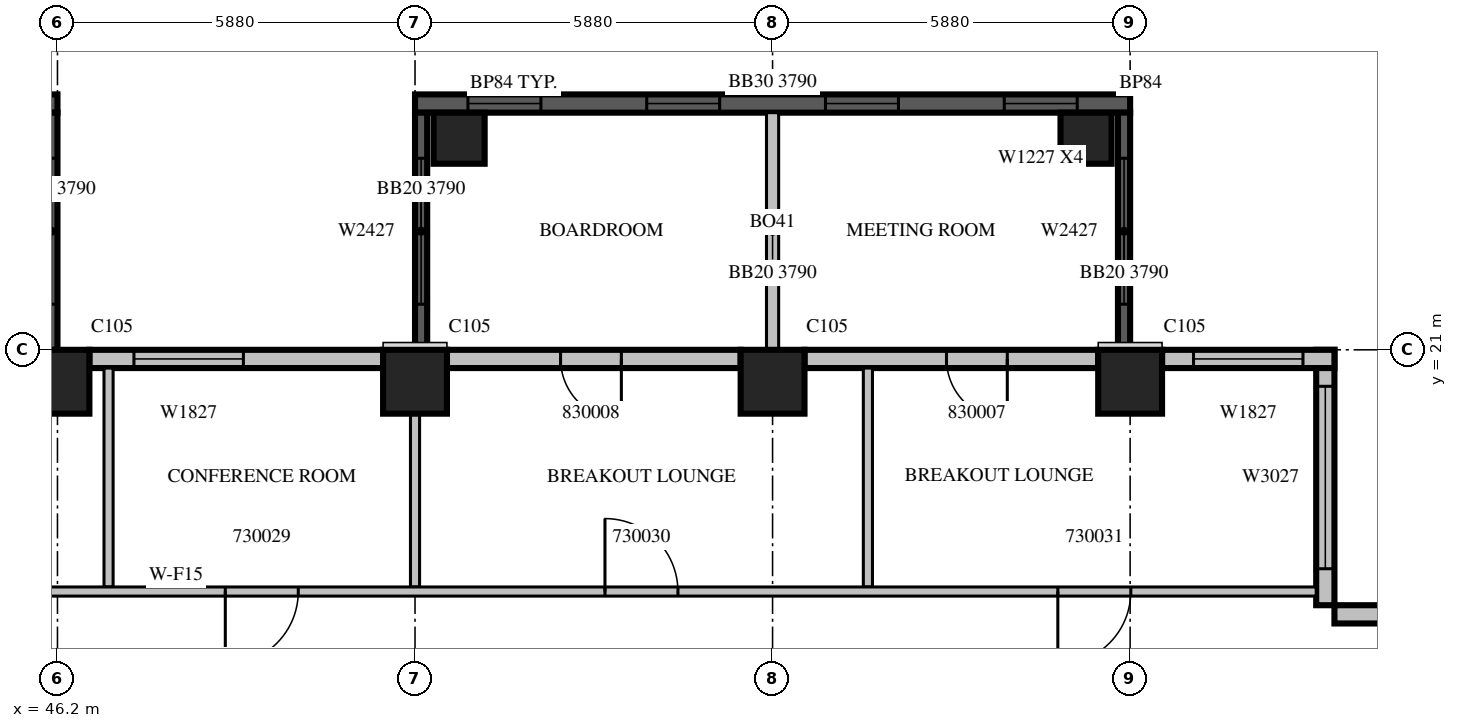
"""IFC4 building model, lengths in metres.
Left out: names, types, materials, properties, quantities, classifications, styles, units other than length and angle.
Written with IfcOpenShell. Run it as: python <this file> out.ifc"""

import sys

from ifc_helpers import new_model, si_unit, direction, frame, frame_2d, origin, origin_2d, place, context, subcontext, project, spatial, rectangle, extrude, source, transform, mapped, element, fill, save


model = new_model("IFC4")
c1 = context("Model", 3, precision=1e-05, world=origin(), true_north=direction((0.0, 1.0)))
c2 = subcontext(c1, "Body", "Model", "MODEL_VIEW")
j1 = project(units=[si_unit("LENGTHUNIT", "METRE"), si_unit("PLANEANGLEUNIT", "RADIAN")], contexts=[c1])
p1 = place(None, origin())
s1 = spatial("IfcSite", under=j1, at=p1, CompositionType="ELEMENT")
p2 = place(p1, origin())
s2 = spatial("IfcBuilding", under=s1, at=p2, CompositionType="ELEMENT")
p3 = place(p2, frame((0.0, 0.0, 137.1)))
s3 = spatial("IfcBuildingStorey", under=s2, at=p3, CompositionType="ELEMENT", Elevation=137.1)
m1 = source(origin(), c2, "Body", "SweptSolid", [
    extrude(rectangle(XDim=1.05, YDim=1.05, at=origin_2d()), origin(), (0.0, 0.0, 1.0), 4.2),
])
for number, where, z_axis, x_axis in (
    (1, (46.2, 20.475, 0.0), (0.0, 0.0, 1.0), (1.0, 0.0, 0.0)),
    (2, (52.08, 20.475, 0.0), (0.0, 0.0, 1.0), (1.0, 0.0, 0.0)),
    (3, (57.96, 20.475, 0.0), (0.0, 0.0, 1.0), (1.0, 0.0, 0.0)),
    (4, (63.84, 20.475, 0.0), (0.0, 0.0, 1.0), (1.0, 0.0, 0.0)),
):
    element("IfcColumn", number, at=place(p3, frame(where, z_axis=z_axis, x_axis=x_axis)), inside=s3, PredefinedType="COLUMN", context=c2, shape_type="MappedRepresentation", body=[
        mapped(m1, transform((0.0, 0.0, 0.0), scale=1.0)),
    ])
m2 = source(origin(), c2, "Body", "SweptSolid", [
    extrude(rectangle(XDim=0.84, YDim=0.84, at=origin_2d()), origin(), (0.0, 0.0, 1.0), 4.2),
])
for number, where, z_axis, x_axis in (
    (5, (52.805, 24.48, 0.0), (0.0, 0.0, 1.0), (1.0, 0.0, 0.0)),
    (6, (63.115, 24.48, 0.0), (0.0, 0.0, 1.0), (1.0, 0.0, 0.0)),
):
    element("IfcColumn", number, at=place(p3, frame(where, z_axis=z_axis, x_axis=x_axis)), inside=s3, PredefinedType="COLUMN", context=c2, shape_type="MappedRepresentation", body=[
        mapped(m2, transform((0.0, 0.0, 0.0), scale=1.0)),
    ])
m3 = source(origin(), c2, "Body", "SweptSolid", [
    extrude(rectangle(XDim=11.76, YDim=0.3, at=frame_2d((5.88, 0.0))), origin(), (0.0, 0.0, 1.0), 3.79),
])
p4 = place(p3, frame((63.84, 25.05, 0.0), z_axis=(0.0, 0.0, 1.0), x_axis=(-1.0, 0.0, 0.0)))
e7 = element("IfcWall", 7, at=p4, inside=s3, PredefinedType="SOLIDWALL", context=c2, shape_type="MappedRepresentation", body=[
    mapped(m3, transform((0.0, 0.0, 0.0), scale=1.0)),
])
m4 = source(origin(), c2, "Body", "SweptSolid", [
    extrude(rectangle(XDim=1.2, YDim=2.7, at=frame_2d((0.6, 1.35))), frame((0.0, 0.16, 0.0), z_axis=(0.0, -1.0, 0.0), x_axis=(1.0, 0.0, 0.0)), (0.0, 0.0, 1.0), 0.32),
])
p5 = place(p4, frame((0.87, 0.0, 0.6)))
e8 = element("IfcOpeningElement", 8, at=p5, cuts=e7, PredefinedType="OPENING", context=c2, shape_type="MappedRepresentation", body=[
    mapped(m4, transform((0.0, 0.0, 0.0), scale=1.0)),
])
p6 = place(p4, frame((3.81, 0.0, 0.6)))
e9 = element("IfcOpeningElement", 9, at=p6, cuts=e7, PredefinedType="OPENING", context=c2, shape_type="MappedRepresentation", body=[
    mapped(m4, transform((0.0, 0.0, 0.0), scale=1.0)),
])
p7 = place(p4, frame((6.75, 0.0, 0.6)))
e10 = element("IfcOpeningElement", 10, at=p7, cuts=e7, PredefinedType="OPENING", context=c2, shape_type="MappedRepresentation", body=[
    mapped(m4, transform((0.0, 0.0, 0.0), scale=1.0)),
])
p8 = place(p4, frame((9.69, 0.0, 0.6)))
e11 = element("IfcOpeningElement", 11, at=p8, cuts=e7, PredefinedType="OPENING", context=c2, shape_type="MappedRepresentation", body=[
    mapped(m4, transform((0.0, 0.0, 0.0), scale=1.0)),
])
m5 = source(origin(), c2, "Body", "SweptSolid", [
    extrude(rectangle(XDim=3.9, YDim=0.2, at=frame_2d((1.95, 0.0))), origin(), (0.0, 0.0, 1.0), 3.79),
])
p9 = place(p3, frame((57.96, 21.0, 0.0), z_axis=(0.0, 0.0, 1.0), x_axis=(0.0, 1.0, 0.0)))
e12 = element("IfcWall", 12, at=p9, inside=s3, PredefinedType="SOLIDWALL", context=c2, shape_type="MappedRepresentation", body=[
    mapped(m5, transform((0.0, 0.0, 0.0), scale=1.0)),
])
m6 = source(origin(), c2, "Body", "SweptSolid", [
    extrude(rectangle(XDim=3.9, YDim=0.2, at=frame_2d((1.95, 0.0))), origin(), (0.0, 0.0, 1.0), 3.79),
])
p10 = place(p3, frame((63.74, 21.0, 0.0), z_axis=(0.0, 0.0, 1.0), x_axis=(0.0, 1.0, 0.0)))
e13 = element("IfcWall", 13, at=p10, inside=s3, PredefinedType="SOLIDWALL", context=c2, shape_type="MappedRepresentation", body=[
    mapped(m6, transform((0.0, 0.0, 0.0), scale=1.0)),
])
m7 = source(origin(), c2, "Body", "SweptSolid", [
    extrude(rectangle(XDim=2.4, YDim=2.7, at=frame_2d((1.2, 1.35))), frame((0.0, 0.11, 0.0), z_axis=(0.0, -1.0, 0.0), x_axis=(1.0, 0.0, 0.0)), (0.0, 0.0, 1.0), 0.22),
])
p11 = place(p10, frame((0.75, 0.0, 0.6)))
e14 = element("IfcOpeningElement", 14, at=p11, cuts=e13, PredefinedType="OPENING", context=c2, shape_type="MappedRepresentation", body=[
    mapped(m7, transform((0.0, 0.0, 0.0), scale=1.0)),
])
p12 = place(p3, frame((52.18, 21.0, 0.0), z_axis=(0.0, 0.0, 1.0), x_axis=(0.0, 1.0, 0.0)))
e15 = element("IfcWall", 15, at=p12, inside=s3, PredefinedType="SOLIDWALL", context=c2, shape_type="MappedRepresentation", body=[
    mapped(m6, transform((0.0, 0.0, 0.0), scale=1.0)),
])
p13 = place(p12, frame((0.75, 0.0, 0.6)))
e16 = element("IfcOpeningElement", 16, at=p13, cuts=e15, PredefinedType="OPENING", context=c2, shape_type="MappedRepresentation", body=[
    mapped(m7, transform((0.0, 0.0, 0.0), scale=1.0)),
])
m8 = source(origin(), c2, "Body", "SweptSolid", [
    extrude(rectangle(XDim=4.2, YDim=0.3, at=frame_2d((2.1, 0.0))), origin(), (0.0, 0.0, 1.0), 3.8),
])
p14 = place(p3, frame((71.4, 16.65, 0.0), z_axis=(0.0, 0.0, 1.0), x_axis=(-1.0, 0.0, 0.0)))
e17 = element("IfcWall", 17, at=p14, inside=s3, PredefinedType="STANDARD", context=c2, shape_type="MappedRepresentation", body=[
    mapped(m8, transform((0.0, 0.0, 0.0), scale=1.0)),
])
p15 = place(p14, frame((0.66, 0.0, 0.6)))
e18 = element("IfcOpeningElement", 18, at=p15, cuts=e17, PredefinedType="OPENING", context=c2, shape_type="MappedRepresentation", body=[
    mapped(m4, transform((0.0, 0.0, 0.0), scale=1.0)),
])
p16 = place(p3, frame((67.05, 16.8, 0.0), z_axis=(0.0, 0.0, 1.0), x_axis=(0.0, 1.0, 0.0)))
e19 = element("IfcWall", 19, at=p16, inside=s3, PredefinedType="STANDARD", context=c2, shape_type="MappedRepresentation", body=[
    mapped(m8, transform((0.0, 0.0, 0.0), scale=1.0)),
])
m9 = source(origin(), c2, "Body", "SweptSolid", [
    extrude(rectangle(XDim=3.0, YDim=2.7, at=frame_2d((1.5, 1.35))), frame((0.0, 0.16, 0.0), z_axis=(0.0, -1.0, 0.0), x_axis=(1.0, 0.0, 0.0)), (0.0, 0.0, 1.0), 0.32),
])
p17 = place(p16, frame((0.6, 0.0, 0.6)))
e20 = element("IfcOpeningElement", 20, at=p17, cuts=e19, PredefinedType="OPENING", context=c2, shape_type="MappedRepresentation", body=[
    mapped(m9, transform((0.0, 0.0, 0.0), scale=1.0)),
])
m10 = source(origin(), c2, "Body", "SweptSolid", [
    extrude(rectangle(XDim=2.835, YDim=0.3, at=frame_2d((1.417, 0.0))), origin(), (0.0, 0.0, 1.0), 3.8),
])
p18 = place(p3, frame((67.2, 20.85, 0.0), z_axis=(0.0, 0.0, 1.0), x_axis=(-1.0, 0.0, 0.0)))
e21 = element("IfcWall", 21, at=p18, inside=s3, PredefinedType="STANDARD", context=c2, shape_type="MappedRepresentation", body=[
    mapped(m10, transform((0.0, 0.0, 0.0), scale=1.0)),
])
m11 = source(origin(), c2, "Body", "SweptSolid", [
    extrude(rectangle(XDim=1.8, YDim=2.7, at=frame_2d((0.9, 1.35))), frame((0.0, 0.16, 0.0), z_axis=(0.0, -1.0, 0.0), x_axis=(1.0, 0.0, 0.0)), (0.0, 0.0, 1.0), 0.32),
])
p19 = place(p18, frame((0.517, 0.0, 0.6)))
e22 = element("IfcOpeningElement", 22, at=p19, cuts=e21, PredefinedType="OPENING", context=c2, shape_type="MappedRepresentation", body=[
    mapped(m11, transform((0.0, 0.0, 0.0), scale=1.0)),
])
m12 = source(origin(), c2, "Body", "SweptSolid", [
    extrude(rectangle(XDim=4.83, YDim=0.3, at=frame_2d((2.415, 0.0))), origin(), (0.0, 0.0, 1.0), 3.8),
])
p20 = place(p3, frame((63.315, 20.85, 0.0), z_axis=(0.0, 0.0, 1.0), x_axis=(-1.0, 0.0, 0.0)))
e23 = element("IfcWall", 23, at=p20, inside=s3, PredefinedType="STANDARD", context=c2, shape_type="MappedRepresentation", body=[
    mapped(m12, transform((0.0, 0.0, 0.0), scale=1.0)),
])
m13 = source(origin(), c2, "Body", "SweptSolid", [
    extrude(rectangle(XDim=1.0, YDim=2.1, at=frame_2d((0.5, 1.05))), frame((0.0, 0.16, 0.0), z_axis=(0.0, -1.0, 0.0), x_axis=(1.0, 0.0, 0.0)), (0.0, 0.0, 1.0), 0.32),
])
p21 = place(p20, frame((1.495, 0.0, 0.0)))
e24 = element("IfcOpeningElement", 24, at=p21, cuts=e23, PredefinedType="OPENING", context=c2, shape_type="MappedRepresentation", body=[
    mapped(m13, transform((0.0, 0.0, 0.0), scale=1.0)),
])
p22 = place(p3, frame((57.435, 20.85, 0.0), z_axis=(0.0, 0.0, 1.0), x_axis=(-1.0, 0.0, 0.0)))
e25 = element("IfcWall", 25, at=p22, inside=s3, PredefinedType="STANDARD", context=c2, shape_type="MappedRepresentation", body=[
    mapped(m12, transform((0.0, 0.0, 0.0), scale=1.0)),
])
p23 = place(p22, frame((1.962, 0.0, 0.0)))
e26 = element("IfcOpeningElement", 26, at=p23, cuts=e25, PredefinedType="OPENING", context=c2, shape_type="MappedRepresentation", body=[
    mapped(m13, transform((0.0, 0.0, 0.0), scale=1.0)),
])
p24 = place(p3, frame((51.555, 20.85, 0.0), z_axis=(0.0, 0.0, 1.0), x_axis=(-1.0, 0.0, 0.0)))
e27 = element("IfcWall", 27, at=p24, inside=s3, PredefinedType="STANDARD", context=c2, shape_type="MappedRepresentation", body=[
    mapped(m12, transform((0.0, 0.0, 0.0), scale=1.0)),
])
p25 = place(p24, frame((2.297, 0.0, 0.6)))
e28 = element("IfcOpeningElement", 28, at=p25, cuts=e27, PredefinedType="OPENING", context=c2, shape_type="MappedRepresentation", body=[
    mapped(m11, transform((0.0, 0.0, 0.0), scale=1.0)),
])
m14 = source(origin(), c2, "Body", "SweptSolid", [
    extrude(rectangle(XDim=4.2, YDim=0.3, at=frame_2d((2.1, 0.0))), origin(), (0.0, 0.0, 1.0), 3.79),
])
p26 = place(p3, frame((46.2, 25.05, 0.0), z_axis=(0.0, 0.0, 1.0), x_axis=(-1.0, 0.0, 0.0)))
e29 = element("IfcWall", 29, at=p26, inside=s3, PredefinedType="SOLIDWALL", context=c2, shape_type="MappedRepresentation", body=[
    mapped(m14, transform((0.0, 0.0, 0.0), scale=1.0)),
])
p27 = place(p26, frame((0.6, 0.0, 0.6)))
e30 = element("IfcOpeningElement", 30, at=p27, cuts=e29, PredefinedType="OPENING", context=c2, shape_type="MappedRepresentation", body=[
    mapped(m9, transform((0.0, 0.0, 0.0), scale=1.0)),
])
p28 = place(p3, frame((46.1, 21.0, 0.0), z_axis=(0.0, 0.0, 1.0), x_axis=(0.0, 1.0, 0.0)))
e31 = element("IfcWall", 31, at=p28, inside=s3, PredefinedType="SOLIDWALL", context=c2, shape_type="MappedRepresentation", body=[
    mapped(m6, transform((0.0, 0.0, 0.0), scale=1.0)),
])
p29 = place(p28, frame((0.75, 0.0, 0.6)))
e32 = element("IfcOpeningElement", 32, at=p29, cuts=e31, PredefinedType="OPENING", context=c2, shape_type="MappedRepresentation", body=[
    mapped(m7, transform((0.0, 0.0, 0.0), scale=1.0)),
])
m15 = source(origin(), c2, "Body", "SweptSolid", [
    extrude(rectangle(XDim=3.6, YDim=0.15, at=frame_2d((1.8, 0.0))), origin(), (0.0, 0.0, 1.0), 3.8),
])
for number, where, z_axis, x_axis in (
    (33, (47.04, 20.7, 0.0), (0.0, 0.0, 1.0), (0.0, -1.0, 0.0)),
    (34, (59.528, 20.7, 0.0), (0.0, 0.0, 1.0), (0.0, -1.0, 0.0)),
):
    element("IfcWall", number, at=place(p3, frame(where, z_axis=z_axis, x_axis=x_axis)), inside=s3, PredefinedType="PARTITIONING", context=c2, shape_type="MappedRepresentation", body=[
        mapped(m15, transform((0.0, 0.0, 0.0), scale=1.0)),
    ])
m16 = source(origin(), c2, "Body", "SweptSolid", [
    extrude(rectangle(XDim=2.851, YDim=0.15, at=frame_2d((1.425, 0.0))), origin(), (0.0, 0.0, 1.0), 3.8),
])
p30 = place(p3, frame((52.08, 17.1, 0.0), z_axis=(0.0, 0.0, 1.0), x_axis=(0.0, 1.0, 0.0)))
e35 = element("IfcWall", 35, at=p30, inside=s3, PredefinedType="PARTITIONING", context=c2, shape_type="MappedRepresentation", body=[
    mapped(m16, transform((0.0, 0.0, 0.0), scale=1.0)),
])
m17 = source(origin(), c2, "Body", "SweptSolid", [
    extrude(rectangle(XDim=37.5, YDim=0.15, at=frame_2d((18.75, 0.0))), origin(), (0.0, 0.0, 1.0), 3.8),
])
p31 = place(p3, frame((29.4, 17.025, 0.0), z_axis=(0.0, 0.0, 1.0), x_axis=(1.0, 0.0, 0.0)))
e36 = element("IfcWall", 36, at=p31, inside=s3, PredefinedType="PARTITIONING", context=c2, shape_type="MappedRepresentation", body=[
    mapped(m17, transform((0.0, 0.0, 0.0), scale=1.0)),
])
m18 = source(origin(), c2, "Body", "SweptSolid", [
    extrude(rectangle(XDim=1.0, YDim=2.1, at=frame_2d((0.5, 1.05))), frame((0.0, 0.085, 0.0), z_axis=(0.0, -1.0, 0.0), x_axis=(1.0, 0.0, 0.0)), (0.0, 0.0, 1.0), 0.17),
])
p32 = place(p31, frame((1.357, 0.0, 0.0)))
e37 = element("IfcOpeningElement", 37, at=p32, cuts=e36, PredefinedType="OPENING", context=c2, shape_type="MappedRepresentation", body=[
    mapped(m18, transform((0.0, 0.0, 0.0), scale=1.0)),
])
p33 = place(p31, frame((4.669, 0.0, 0.0)))
e38 = element("IfcOpeningElement", 38, at=p33, cuts=e36, PredefinedType="OPENING", context=c2, shape_type="MappedRepresentation", body=[
    mapped(m18, transform((0.0, 0.0, 0.0), scale=1.0)),
])
p34 = place(p31, frame((7.012, 0.0, 0.0)))
e39 = element("IfcOpeningElement", 39, at=p34, cuts=e36, PredefinedType="OPENING", context=c2, shape_type="MappedRepresentation", body=[
    mapped(m18, transform((0.0, 0.0, 0.0), scale=1.0)),
])
m19 = source(origin(), c2, "Body", "SweptSolid", [
    extrude(rectangle(XDim=0.9, YDim=2.1, at=frame_2d((0.45, 1.05))), frame((0.0, 0.085, 0.0), z_axis=(0.0, -1.0, 0.0), x_axis=(1.0, 0.0, 0.0)), (0.0, 0.0, 1.0), 0.17),
])
p35 = place(p31, frame((9.158, 0.0, 0.0)))
e40 = element("IfcOpeningElement", 40, at=p35, cuts=e36, PredefinedType="OPENING", context=c2, shape_type="MappedRepresentation", body=[
    mapped(m19, transform((0.0, 0.0, 0.0), scale=1.0)),
])
p36 = place(p31, frame((11.258, 0.0, 0.0)))
e41 = element("IfcOpeningElement", 41, at=p36, cuts=e36, PredefinedType="OPENING", context=c2, shape_type="MappedRepresentation", body=[
    mapped(m19, transform((0.0, 0.0, 0.0), scale=1.0)),
])
m20 = source(origin(), c2, "Body", "SweptSolid", [
    extrude(rectangle(XDim=1.2, YDim=2.1, at=frame_2d((0.6, 1.05))), frame((0.0, 0.085, 0.0), z_axis=(0.0, -1.0, 0.0), x_axis=(1.0, 0.0, 0.0)), (0.0, 0.0, 1.0), 0.17),
])
p37 = place(p31, frame((14.52, 0.0, 0.0)))
e42 = element("IfcOpeningElement", 42, at=p37, cuts=e36, PredefinedType="OPENING", context=c2, shape_type="MappedRepresentation", body=[
    mapped(m20, transform((0.0, 0.0, 0.0), scale=1.0)),
])
p38 = place(p31, frame((19.56, 0.0, 0.0)))
e43 = element("IfcOpeningElement", 43, at=p38, cuts=e36, PredefinedType="OPENING", context=c2, shape_type="MappedRepresentation", body=[
    mapped(m20, transform((0.0, 0.0, 0.0), scale=1.0)),
])
p39 = place(p31, frame((25.804, 0.0, 0.0)))
e44 = element("IfcOpeningElement", 44, at=p39, cuts=e36, PredefinedType="OPENING", context=c2, shape_type="MappedRepresentation", body=[
    mapped(m20, transform((0.0, 0.0, 0.0), scale=1.0)),
])
p40 = place(p31, frame((33.251, 0.0, 0.0)))
e45 = element("IfcOpeningElement", 45, at=p40, cuts=e36, PredefinedType="OPENING", context=c2, shape_type="MappedRepresentation", body=[
    mapped(m20, transform((0.0, 0.0, 0.0), scale=1.0)),
])
m21 = source(origin(), c2, "Body", "SweptSolid", [
    extrude(rectangle(XDim=1.2, YDim=2.7, at=frame_2d((0.6, 1.35))), frame((0.0, 0.03, 0.0), z_axis=(0.0, -1.0, 0.0), x_axis=(1.0, 0.0, 0.0)), (0.0, 0.0, 1.0), 0.06),
])
p41 = place(p5, origin())
e46 = element("IfcWindow", 46, at=p41, inside=s3, PartitioningType="SINGLE_PANEL", PredefinedType="WINDOW", context=c2, shape_type="MappedRepresentation", body=[
    mapped(m21, transform((0.0, 0.0, 0.0), scale=1.0)),
])
fill(e8, e46)
p42 = place(p6, origin())
e47 = element("IfcWindow", 47, at=p42, inside=s3, PartitioningType="SINGLE_PANEL", PredefinedType="WINDOW", context=c2, shape_type="MappedRepresentation", body=[
    mapped(m21, transform((0.0, 0.0, 0.0), scale=1.0)),
])
fill(e9, e47)
p43 = place(p7, origin())
e48 = element("IfcWindow", 48, at=p43, inside=s3, PartitioningType="SINGLE_PANEL", PredefinedType="WINDOW", context=c2, shape_type="MappedRepresentation", body=[
    mapped(m21, transform((0.0, 0.0, 0.0), scale=1.0)),
])
fill(e10, e48)
p44 = place(p8, origin())
e49 = element("IfcWindow", 49, at=p44, inside=s3, PartitioningType="SINGLE_PANEL", PredefinedType="WINDOW", context=c2, shape_type="MappedRepresentation", body=[
    mapped(m21, transform((0.0, 0.0, 0.0), scale=1.0)),
])
fill(e11, e49)
m22 = source(origin(), c2, "Body", "SweptSolid", [
    extrude(rectangle(XDim=2.4, YDim=2.7, at=frame_2d((1.2, 1.35))), frame((0.0, 0.03, 0.0), z_axis=(0.0, -1.0, 0.0), x_axis=(1.0, 0.0, 0.0)), (0.0, 0.0, 1.0), 0.06),
])
p45 = place(p11, origin())
e50 = element("IfcWindow", 50, at=p45, inside=s3, PartitioningType="SINGLE_PANEL", PredefinedType="WINDOW", context=c2, shape_type="MappedRepresentation", body=[
    mapped(m22, transform((0.0, 0.0, 0.0), scale=1.0)),
])
fill(e14, e50)
p46 = place(p13, origin())
e51 = element("IfcWindow", 51, at=p46, inside=s3, PartitioningType="SINGLE_PANEL", PredefinedType="WINDOW", context=c2, shape_type="MappedRepresentation", body=[
    mapped(m22, transform((0.0, 0.0, 0.0), scale=1.0)),
])
fill(e16, e51)
m23 = source(origin(), c2, "Body", "SweptSolid", [
    extrude(rectangle(XDim=3.0, YDim=2.7, at=frame_2d((1.5, 1.35))), frame((0.0, 0.03, 0.0), z_axis=(0.0, -1.0, 0.0), x_axis=(1.0, 0.0, 0.0)), (0.0, 0.0, 1.0), 0.06),
])
p47 = place(p17, origin())
e52 = element("IfcWindow", 52, at=p47, inside=s3, PartitioningType="SINGLE_PANEL", PredefinedType="WINDOW", context=c2, shape_type="MappedRepresentation", body=[
    mapped(m23, transform((0.0, 0.0, 0.0), scale=1.0)),
])
fill(e20, e52)
m24 = source(origin(), c2, "Body", "SweptSolid", [
    extrude(rectangle(XDim=1.8, YDim=2.7, at=frame_2d((0.9, 1.35))), frame((0.0, 0.03, 0.0), z_axis=(0.0, -1.0, 0.0), x_axis=(1.0, 0.0, 0.0)), (0.0, 0.0, 1.0), 0.06),
])
p48 = place(p25, origin())
e53 = element("IfcWindow", 53, at=p48, inside=s3, PartitioningType="SINGLE_PANEL", PredefinedType="WINDOW", context=c2, shape_type="MappedRepresentation", body=[
    mapped(m24, transform((0.0, 0.0, 0.0), scale=1.0)),
])
fill(e28, e53)
p49 = place(p19, origin())
e54 = element("IfcWindow", 54, at=p49, inside=s3, PartitioningType="SINGLE_PANEL", PredefinedType="WINDOW", context=c2, shape_type="MappedRepresentation", body=[
    mapped(m24, transform((0.0, 0.0, 0.0), scale=1.0)),
])
fill(e22, e54)
p50 = place(p29, origin())
e55 = element("IfcWindow", 55, at=p50, inside=s3, PartitioningType="SINGLE_PANEL", PredefinedType="WINDOW", context=c2, shape_type="MappedRepresentation", body=[
    mapped(m22, transform((0.0, 0.0, 0.0), scale=1.0)),
])
fill(e32, e55)
m25 = source(origin(), c2, "Body", "SweptSolid", [
    extrude(rectangle(XDim=1.2, YDim=2.1, at=frame_2d((0.6, 1.05))), frame((0.0, 0.025, 0.0), z_axis=(0.0, -1.0, 0.0), x_axis=(1.0, 0.0, 0.0)), (0.0, 0.0, 1.0), 0.05),
])
p51 = place(p38, origin())
e56 = element("IfcDoor", 56, at=p51, inside=s3, OperationType="SINGLE_SWING_RIGHT", PredefinedType="DOOR", context=c2, shape_type="MappedRepresentation", body=[
    mapped(m25, transform((0.0, 0.0, 0.0), scale=1.0)),
])
fill(e43, e56)
p52 = place(p39, origin())
e57 = element("IfcDoor", 57, at=p52, inside=s3, OperationType="SINGLE_SWING_LEFT", PredefinedType="DOOR", context=c2, shape_type="MappedRepresentation", body=[
    mapped(m25, transform((0.0, 0.0, 0.0), scale=1.0)),
])
fill(e44, e57)
p53 = place(p40, origin())
e58 = element("IfcDoor", 58, at=p53, inside=s3, OperationType="SINGLE_SWING_RIGHT", PredefinedType="DOOR", context=c2, shape_type="MappedRepresentation", body=[
    mapped(m25, transform((0.0, 0.0, 0.0), scale=1.0)),
])
fill(e45, e58)
m26 = source(origin(), c2, "Body", "SweptSolid", [
    extrude(rectangle(XDim=1.0, YDim=2.1, at=frame_2d((0.5, 1.05))), frame((0.0, 0.025, 0.0), z_axis=(0.0, -1.0, 0.0), x_axis=(1.0, 0.0, 0.0)), (0.0, 0.0, 1.0), 0.05),
])
p54 = place(p21, origin())
e59 = element("IfcDoor", 59, at=p54, inside=s3, OperationType="SINGLE_SWING_LEFT", PredefinedType="DOOR", context=c2, shape_type="MappedRepresentation", body=[
    mapped(m26, transform((0.0, 0.0, 0.0), scale=1.0)),
])
fill(e24, e59)
p55 = place(p23, origin())
e60 = element("IfcDoor", 60, at=p55, inside=s3, OperationType="SINGLE_SWING_LEFT", PredefinedType="DOOR", context=c2, shape_type="MappedRepresentation", body=[
    mapped(m26, transform((0.0, 0.0, 0.0), scale=1.0)),
])
fill(e26, e60)
save(model, sys.argv[1])
